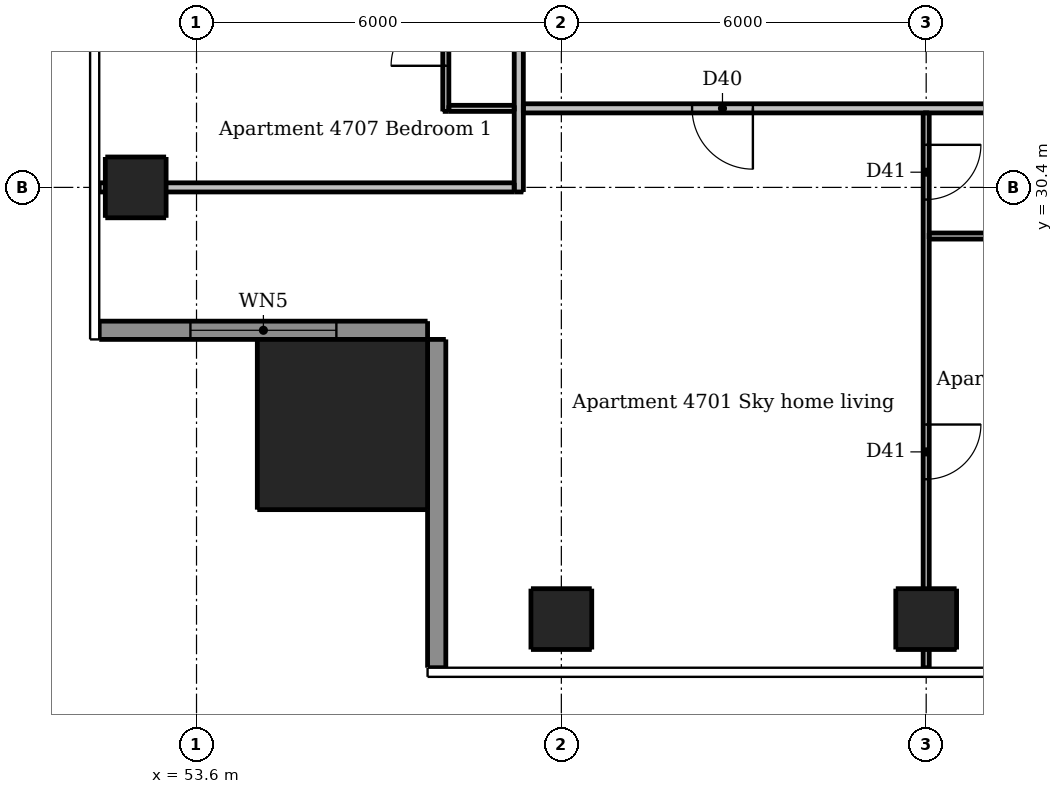
"""IFC4 building model, lengths in metres.
Left out: names, types, materials, properties, quantities, classifications, styles, units other than length and angle.
Written with IfcOpenShell. Run it as: python <this file> out.ifc"""

import sys

from ifc_helpers import new_model, si_unit, direction, frame, frame_2d, origin, origin_2d, place, context, subcontext, project, spatial, rectangle, extrude, element, fill, save


model = new_model("IFC4")
c1 = context("Model", 3, precision=1e-05, world=origin(), true_north=direction((0.0, 1.0)))
c2 = subcontext(c1, "Body", "Model", "MODEL_VIEW")
j1 = project(units=[si_unit("LENGTHUNIT", "METRE"), si_unit("PLANEANGLEUNIT", "RADIAN")], contexts=[c1])
p1 = place(None, origin())
s1 = spatial("IfcSite", under=j1, at=p1, CompositionType="ELEMENT")
p2 = place(p1, origin())
s2 = spatial("IfcBuilding", under=s1, at=p2, CompositionType="ELEMENT")
p3 = place(p2, frame((0.0, 0.0, 174.7)))
s3 = spatial("IfcBuildingStorey", under=s2, at=p3, CompositionType="ELEMENT", Elevation=174.7)
for number, where, z_axis, x_axis in (
    (1, (59.6, 23.3, 0.0), (0.0, 0.0, 1.0), (1.0, 0.0, 0.0)),
    (2, (65.6, 23.3, 0.0), (0.0, 0.0, 1.0), (1.0, 0.0, 0.0)),
    (3, (52.6, 30.4, 0.0), (0.0, 0.0, 1.0), (1.0, 0.0, 0.0)),
):
    element("IfcColumn", number, at=place(p3, frame(where, z_axis=z_axis, x_axis=x_axis)), inside=s3, PredefinedType="COLUMN", context=c2, shape_type="SweptSolid", body=[
        extrude(rectangle(XDim=1.0, YDim=1.0, at=origin_2d()), origin(), (0.0, 0.0, 1.0), 2.95),
    ])
p4 = place(p3, frame((56.0, 26.5, 0.0), z_axis=(0.0, 0.0, 1.0), x_axis=(1.0, 0.0, 0.0)))
e4 = element("IfcColumn", 4, at=p4, inside=s3, PredefinedType="COLUMN", context=c2, shape_type="SweptSolid", body=[
    extrude(rectangle(XDim=2.8, YDim=2.8, at=origin_2d()), origin(), (0.0, 0.0, 1.0), 3.3),
])
p5 = place(p3, frame((52.0, 28.05, 0.0), z_axis=(0.0, 0.0, 1.0), x_axis=(1.0, 0.0, 0.0)))
e5 = element("IfcWall", 5, at=p5, inside=s3, PredefinedType="SOLIDWALL", context=c2, shape_type="SweptSolid", body=[
    extrude(rectangle(XDim=5.4, YDim=0.3, at=frame_2d((2.7, 0.0))), origin(), (0.0, 0.0, 1.0), 2.95),
])
p6 = place(p5, frame((1.5, 0.0, 0.15)))
e6 = element("IfcOpeningElement", 6, at=p6, cuts=e5, PredefinedType="OPENING", context=c2, shape_type="SweptSolid", body=[
    extrude(rectangle(XDim=2.4, YDim=2.1, at=frame_2d((1.2, 1.05))), frame((0.0, 0.16, 0.0), z_axis=(0.0, -1.0, 0.0), x_axis=(1.0, 0.0, 0.0)), (0.0, 0.0, 1.0), 0.32),
])
p7 = place(p3, frame((57.55, 27.9, 0.0), z_axis=(0.0, 0.0, 1.0), x_axis=(0.0, -1.0, 0.0)))
e7 = element("IfcWall", 7, at=p7, inside=s3, PredefinedType="SOLIDWALL", context=c2, shape_type="SweptSolid", body=[
    extrude(rectangle(XDim=5.4, YDim=0.3, at=frame_2d((2.7, 0.0))), origin(), (0.0, 0.0, 1.0), 2.95),
])
p8 = place(p3, frame((57.7, 31.65, 0.0), z_axis=(0.0, 0.0, 1.0), x_axis=(0.0, 1.0, 0.0)))
e8 = element("IfcWall", 8, at=p8, inside=s3, PredefinedType="PARTITIONING", context=c2, shape_type="SweptSolid", body=[
    extrude(rectangle(XDim=16.675, YDim=0.1, at=frame_2d((8.337, 0.0))), origin(), (0.0, 0.0, 1.0), 2.95),
])
p9 = place(p8, frame((12.1, 0.0, 0.0)))
e9 = element("IfcOpeningElement", 9, at=p9, cuts=e8, PredefinedType="OPENING", context=c2, shape_type="SweptSolid", body=[
    extrude(rectangle(XDim=0.9, YDim=2.1, at=frame_2d((0.45, 1.05))), frame((0.0, 0.06, 0.0), z_axis=(0.0, -1.0, 0.0), x_axis=(1.0, 0.0, 0.0)), (0.0, 0.0, 1.0), 0.12),
])
p10 = place(p8, frame((15.1, 0.0, 0.0)))
e10 = element("IfcOpeningElement", 10, at=p10, cuts=e8, PredefinedType="OPENING", context=c2, shape_type="SweptSolid", body=[
    extrude(rectangle(XDim=0.9, YDim=2.1, at=frame_2d((0.45, 1.05))), frame((0.0, 0.06, 0.0), z_axis=(0.0, -1.0, 0.0), x_axis=(1.0, 0.0, 0.0)), (0.0, 0.0, 1.0), 0.12),
])
p11 = place(p8, frame((0.75, 0.0, 0.0)))
e11 = element("IfcOpeningElement", 11, at=p11, cuts=e8, PredefinedType="OPENING", context=c2, shape_type="SweptSolid", body=[
    extrude(rectangle(XDim=0.9, YDim=2.1, at=frame_2d((0.45, 1.05))), frame((0.0, 0.06, 0.0), z_axis=(0.0, -1.0, 0.0), x_axis=(1.0, 0.0, 0.0)), (0.0, 0.0, 1.0), 0.12),
])
p12 = place(p8, frame((6.1, 0.0, 0.0)))
e12 = element("IfcOpeningElement", 12, at=p12, cuts=e8, PredefinedType="OPENING", context=c2, shape_type="SweptSolid", body=[
    extrude(rectangle(XDim=0.9, YDim=2.1, at=frame_2d((0.45, 1.05))), frame((0.0, 0.06, 0.0), z_axis=(0.0, -1.0, 0.0), x_axis=(1.0, 0.0, 0.0)), (0.0, 0.0, 1.0), 0.12),
])
p13 = place(p8, frame((3.15, 0.0, 0.0)))
e13 = element("IfcOpeningElement", 13, at=p13, cuts=e8, PredefinedType="OPENING", context=c2, shape_type="SweptSolid", body=[
    extrude(rectangle(XDim=0.8, YDim=2.1, at=frame_2d((0.4, 1.05))), frame((0.0, 0.06, 0.0), z_axis=(0.0, -1.0, 0.0), x_axis=(1.0, 0.0, 0.0)), (0.0, 0.0, 1.0), 0.12),
])
p14 = place(p8, frame((9.15, 0.0, 0.0)))
e14 = element("IfcOpeningElement", 14, at=p14, cuts=e8, PredefinedType="OPENING", context=c2, shape_type="SweptSolid", body=[
    extrude(rectangle(XDim=0.8, YDim=2.1, at=frame_2d((0.4, 1.05))), frame((0.0, 0.06, 0.0), z_axis=(0.0, -1.0, 0.0), x_axis=(1.0, 0.0, 0.0)), (0.0, 0.0, 1.0), 0.12),
])
p15 = place(p3, frame((65.6, 31.625, 0.0), z_axis=(0.0, 0.0, 1.0), x_axis=(0.0, -1.0, 0.0)))
e15 = element("IfcWall", 15, at=p15, inside=s3, PredefinedType="PARTITIONING", context=c2, shape_type="SweptSolid", body=[
    extrude(rectangle(XDim=9.125, YDim=0.1, at=frame_2d((4.562, 0.0))), origin(), (0.0, 0.0, 1.0), 2.332),
])
p16 = place(p15, frame((0.525, 0.0, 0.0)))
e16 = element("IfcOpeningElement", 16, at=p16, cuts=e15, PredefinedType="OPENING", context=c2, shape_type="SweptSolid", body=[
    extrude(rectangle(XDim=0.9, YDim=2.1, at=frame_2d((0.45, 1.05))), frame((0.0, 0.06, 0.0), z_axis=(0.0, -1.0, 0.0), x_axis=(1.0, 0.0, 0.0)), (0.0, 0.0, 1.0), 0.12),
])
p17 = place(p15, frame((5.125, 0.0, 0.0)))
e17 = element("IfcOpeningElement", 17, at=p17, cuts=e15, PredefinedType="OPENING", context=c2, shape_type="SweptSolid", body=[
    extrude(rectangle(XDim=0.9, YDim=2.1, at=frame_2d((0.45, 1.05))), frame((0.0, 0.06, 0.0), z_axis=(0.0, -1.0, 0.0), x_axis=(1.0, 0.0, 0.0)), (0.0, 0.0, 1.0), 0.12),
])
p18 = place(p3, frame((57.75, 31.7, 0.0), z_axis=(0.0, 0.0, 1.0), x_axis=(1.0, 0.0, 0.0)))
e18 = element("IfcWall", 18, at=p18, inside=s3, PredefinedType="PARTITIONING", context=c2, shape_type="SweptSolid", body=[
    extrude(rectangle(XDim=1.075, YDim=0.1, at=frame_2d((0.538, 0.0))), origin(), (0.0, 0.0, 1.0), 2.95),
])
p19 = place(p3, frame((65.65, 29.6, 0.0), z_axis=(0.0, 0.0, 1.0), x_axis=(1.0, 0.0, 0.0)))
e19 = element("IfcWall", 19, at=p19, inside=s3, PredefinedType="PARTITIONING", context=c2, shape_type="SweptSolid", body=[
    extrude(rectangle(XDim=5.875, YDim=0.1, at=frame_2d((2.938, 0.0))), origin(), (0.0, 0.0, 1.0), 2.95),
])
p20 = place(p19, frame((3.75, 0.0, 0.0)))
e20 = element("IfcOpeningElement", 20, at=p20, cuts=e19, PredefinedType="OPENING", context=c2, shape_type="SweptSolid", body=[
    extrude(rectangle(XDim=0.8, YDim=2.1, at=frame_2d((0.4, 1.05))), frame((0.0, 0.06, 0.0), z_axis=(0.0, -1.0, 0.0), x_axis=(1.0, 0.0, 0.0)), (0.0, 0.0, 1.0), 0.12),
])
p21 = place(p3, frame((58.9, 30.325, 0.0), z_axis=(0.0, 0.0, 1.0), x_axis=(0.0, 1.0, 0.0)))
e21 = element("IfcWall", 21, at=p21, inside=s3, PredefinedType="PARTITIONING", context=c2, shape_type="SweptSolid", body=[
    extrude(rectangle(XDim=30.85, YDim=0.15, at=frame_2d((15.425, 0.0))), origin(), (0.0, 0.0, 1.0), 2.95),
])
p22 = place(p21, frame((9.225, 0.0, 0.0)))
e22 = element("IfcOpeningElement", 22, at=p22, cuts=e21, PredefinedType="OPENING", context=c2, shape_type="SweptSolid", body=[
    extrude(rectangle(XDim=1.0, YDim=2.1, at=frame_2d((0.5, 1.05))), frame((0.0, 0.085, 0.0), z_axis=(0.0, -1.0, 0.0), x_axis=(1.0, 0.0, 0.0)), (0.0, 0.0, 1.0), 0.17),
])
p23 = place(p21, frame((26.925, 0.0, 0.0)))
e23 = element("IfcOpeningElement", 23, at=p23, cuts=e21, PredefinedType="OPENING", context=c2, shape_type="SweptSolid", body=[
    extrude(rectangle(XDim=1.0, YDim=2.1, at=frame_2d((0.5, 1.05))), frame((0.0, 0.085, 0.0), z_axis=(0.0, -1.0, 0.0), x_axis=(1.0, 0.0, 0.0)), (0.0, 0.0, 1.0), 0.17),
])
p24 = place(p3, frame((89.525, 31.7, 0.0), z_axis=(0.0, 0.0, 1.0), x_axis=(-1.0, 0.0, 0.0)))
e24 = element("IfcWall", 24, at=p24, inside=s3, PredefinedType="PARTITIONING", context=c2, shape_type="SweptSolid", body=[
    extrude(rectangle(XDim=30.55, YDim=0.15, at=frame_2d((15.275, 0.0))), origin(), (0.0, 0.0, 1.0), 2.95),
])
p25 = place(p24, frame((26.775, 0.0, 0.0)))
e25 = element("IfcOpeningElement", 25, at=p25, cuts=e24, PredefinedType="OPENING", context=c2, shape_type="SweptSolid", body=[
    extrude(rectangle(XDim=1.0, YDim=2.1, at=frame_2d((0.5, 1.05))), frame((0.0, 0.085, 0.0), z_axis=(0.0, -1.0, 0.0), x_axis=(1.0, 0.0, 0.0)), (0.0, 0.0, 1.0), 0.17),
])
p26 = place(p24, frame((8.425, 0.0, 0.0)))
e26 = element("IfcOpeningElement", 26, at=p26, cuts=e24, PredefinedType="OPENING", context=c2, shape_type="SweptSolid", body=[
    extrude(rectangle(XDim=1.0, YDim=2.1, at=frame_2d((0.5, 1.05))), frame((0.0, 0.085, 0.0), z_axis=(0.0, -1.0, 0.0), x_axis=(1.0, 0.0, 0.0)), (0.0, 0.0, 1.0), 0.17),
])
p27 = place(p3, frame((52.0, 30.4, 0.0), z_axis=(0.0, 0.0, 1.0), x_axis=(1.0, 0.0, 0.0)))
e27 = element("IfcWall", 27, at=p27, inside=s3, PredefinedType="PARTITIONING", context=c2, shape_type="SweptSolid", body=[
    extrude(rectangle(XDim=6.825, YDim=0.15, at=frame_2d((3.413, 0.0))), origin(), (0.0, 0.0, 1.0), 2.332),
])
p28 = place(p6, origin())
e28 = element("IfcWindow", 28, at=p28, inside=s3, PartitioningType="DOUBLE_PANEL_VERTICAL", PredefinedType="WINDOW", context=c2, shape_type="SweptSolid", body=[
    extrude(rectangle(XDim=2.4, YDim=2.1, at=frame_2d((1.2, 1.05))), frame((0.0, 0.03, 0.0), z_axis=(0.0, -1.0, 0.0), x_axis=(1.0, 0.0, 0.0)), (0.0, 0.0, 1.0), 0.06),
])
fill(e6, e28)
p29 = place(p25, origin())
e29 = element("IfcDoor", 29, at=p29, inside=s3, OperationType="SINGLE_SWING_LEFT", PredefinedType="DOOR", context=c2, shape_type="SweptSolid", body=[
    extrude(rectangle(XDim=1.0, YDim=2.1, at=frame_2d((0.5, 1.05))), frame((0.0, 0.025, 0.0), z_axis=(0.0, -1.0, 0.0), x_axis=(1.0, 0.0, 0.0)), (0.0, 0.0, 1.0), 0.05),
])
fill(e25, e29)
p30 = place(p16, origin())
e30 = element("IfcDoor", 30, at=p30, inside=s3, OperationType="SINGLE_SWING_LEFT", PredefinedType="DOOR", context=c2, shape_type="SweptSolid", body=[
    extrude(rectangle(XDim=0.9, YDim=2.1, at=frame_2d((0.45, 1.05))), frame((0.0, 0.025, 0.0), z_axis=(0.0, -1.0, 0.0), x_axis=(1.0, 0.0, 0.0)), (0.0, 0.0, 1.0), 0.05),
])
fill(e16, e30)
p31 = place(p17, origin())
e31 = element("IfcDoor", 31, at=p31, inside=s3, OperationType="SINGLE_SWING_LEFT", PredefinedType="DOOR", context=c2, shape_type="SweptSolid", body=[
    extrude(rectangle(XDim=0.9, YDim=2.1, at=frame_2d((0.45, 1.05))), frame((0.0, 0.025, 0.0), z_axis=(0.0, -1.0, 0.0), x_axis=(1.0, 0.0, 0.0)), (0.0, 0.0, 1.0), 0.05),
])
fill(e17, e31)
p32 = place(p11, origin())
e32 = element("IfcDoor", 32, at=p32, inside=s3, OperationType="SINGLE_SWING_LEFT", PredefinedType="DOOR", context=c2, shape_type="SweptSolid", body=[
    extrude(rectangle(XDim=0.9, YDim=2.1, at=frame_2d((0.45, 1.05))), frame((0.0, 0.025, 0.0), z_axis=(0.0, -1.0, 0.0), x_axis=(1.0, 0.0, 0.0)), (0.0, 0.0, 1.0), 0.05),
])
fill(e11, e32)
save(model, sys.argv[1])
